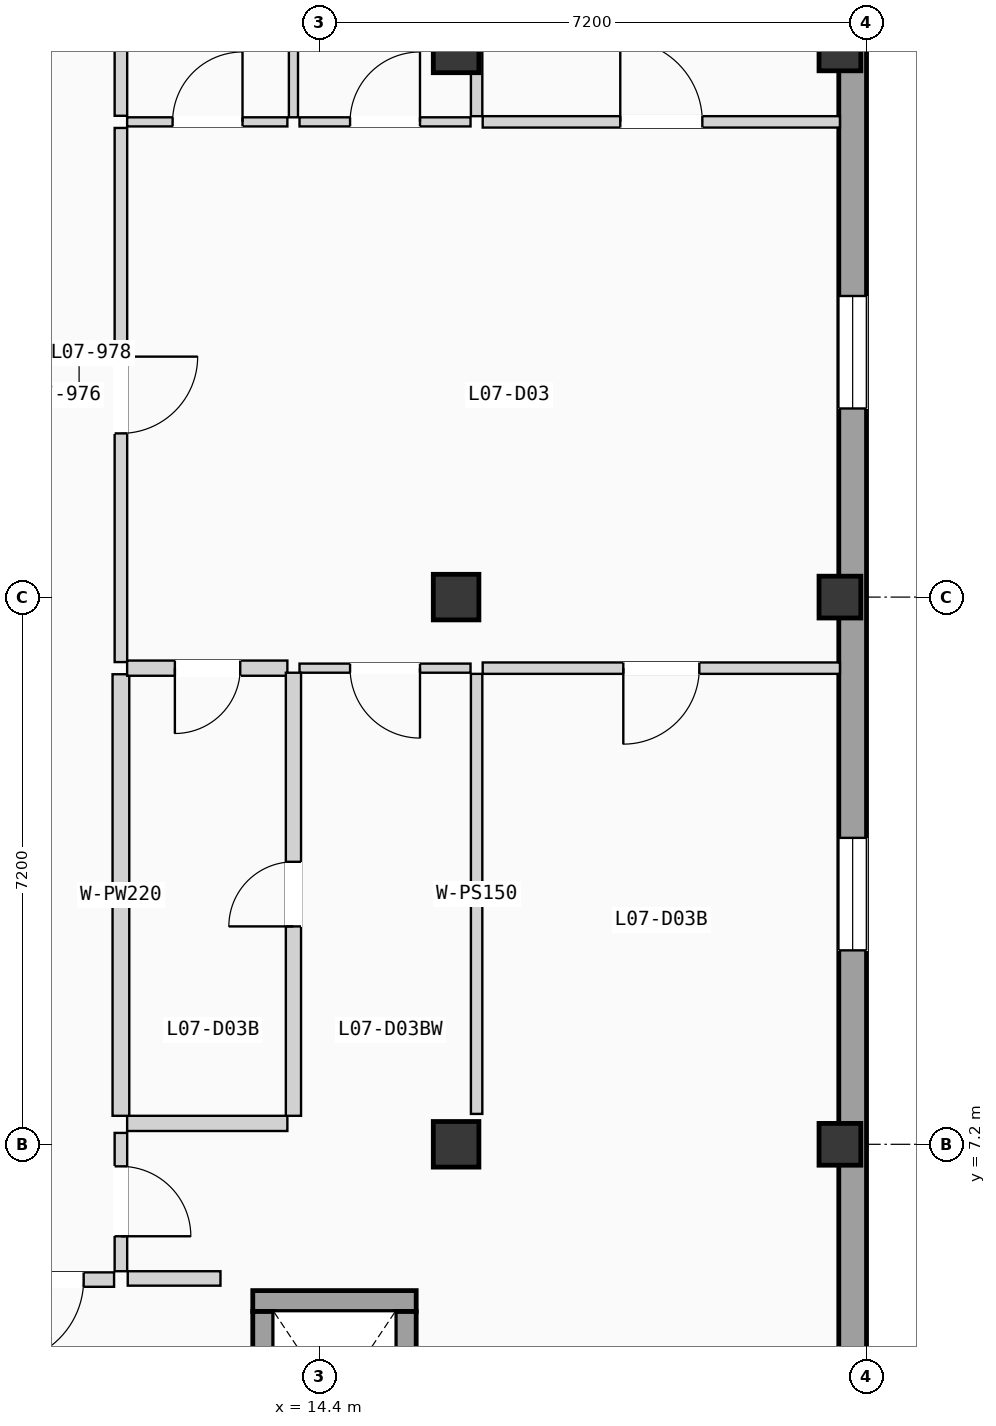
"""IFC4 building model, lengths in metres.
Left out: names, types, materials, properties, quantities, classifications, styles, units other than length and angle.
Written with IfcOpenShell. Run it as: python <this file> out.ifc"""

import sys

from ifc_helpers import new_model, si_unit, direction, frame, frame_2d, origin, origin_2d, place, context, subcontext, project, spatial, rectangle, extrude, element, fill, save


model = new_model("IFC4")
c1 = context("Model", 3, precision=1e-05, world=origin(), true_north=direction((0.0, 1.0)))
c2 = subcontext(c1, "Body", "Model", "MODEL_VIEW")
j1 = project(units=[si_unit("LENGTHUNIT", "METRE"), si_unit("PLANEANGLEUNIT", "RADIAN")], contexts=[c1])
p1 = place(None, origin())
s1 = spatial("IfcSite", under=j1, at=p1, CompositionType="ELEMENT")
p2 = place(p1, origin())
s2 = spatial("IfcBuilding", under=s1, at=p2, CompositionType="ELEMENT")
p3 = place(p2, frame((0.0, 0.0, 24.675)))
s3 = spatial("IfcBuildingStorey", under=s2, at=p3, CompositionType="ELEMENT", Elevation=24.675)
for number, where, z_axis, x_axis in (
    (1, (16.2, 7.2, 0.0), (0.0, 0.0, 1.0), (1.0, 0.0, 0.0)),
    (2, (16.2, 14.4, 0.0), (0.0, 0.0, 1.0), (1.0, 0.0, 0.0)),
    (3, (16.2, 21.6, 0.0), (0.0, 0.0, 1.0), (1.0, 0.0, 0.0)),
):
    element("IfcColumn", number, at=place(p3, frame(where, z_axis=z_axis, x_axis=x_axis)), inside=s3, PredefinedType="COLUMN", context=c2, shape_type="SweptSolid", body=[
        extrude(rectangle(XDim=0.6, YDim=0.6, at=origin_2d()), origin(), (0.0, 0.0, 1.0), 3.15),
    ])
for number, where, z_axis, x_axis in (
    (4, (21.25, 7.2, 0.0), (0.0, 0.0, 1.0), (1.0, 0.0, 0.0)),
    (5, (21.25, 14.4, 0.0), (0.0, 0.0, 1.0), (1.0, 0.0, 0.0)),
    (6, (21.25, 21.6, 0.0), (0.0, 0.0, 1.0), (1.0, 0.0, 0.0)),
):
    element("IfcColumn", number, at=place(p3, frame(where, z_axis=z_axis, x_axis=x_axis)), inside=s3, PredefinedType="COLUMN", context=c2, shape_type="SweptSolid", body=[
        extrude(rectangle(XDim=0.55, YDim=0.55, at=origin_2d()), origin(), (0.0, 0.0, 1.0), 3.15),
    ])
p4 = place(p3, frame((21.417, 0.365, 0.0), z_axis=(0.0, 0.0, 1.0), x_axis=(0.0, 1.0, 0.0)))
e7 = element("IfcWall", 7, at=p4, inside=s3, PredefinedType="SOLIDWALL", context=c2, shape_type="SweptSolid", body=[
    extrude(rectangle(XDim=49.67, YDim=0.365, at=frame_2d((24.835, 0.0))), origin(), (0.0, 0.0, 1.0), 2.6),
])
p5 = place(p4, frame((16.517, 0.0, 0.9)))
e8 = element("IfcOpeningElement", 8, at=p5, cuts=e7, PredefinedType="OPENING", context=c2, shape_type="SweptSolid", body=[
    extrude(rectangle(XDim=1.48, YDim=1.2, at=frame_2d((0.74, 0.6))), frame((0.0, 0.192, 0.0), z_axis=(0.0, -1.0, 0.0), x_axis=(1.0, 0.0, 0.0)), (0.0, 0.0, 1.0), 0.385),
])
p6 = place(p4, frame((9.387, 0.0, 0.815)))
e9 = element("IfcOpeningElement", 9, at=p6, cuts=e7, PredefinedType="OPENING", context=c2, shape_type="SweptSolid", body=[
    extrude(rectangle(XDim=1.48, YDim=1.35, at=frame_2d((0.74, 0.675))), frame((0.0, 0.192, 0.0), z_axis=(0.0, -1.0, 0.0), x_axis=(1.0, 0.0, 0.0)), (0.0, 0.0, 1.0), 0.385),
])
p7 = place(p4, frame((23.089, 0.0, 0.665)))
e10 = element("IfcOpeningElement", 10, at=p7, cuts=e7, PredefinedType="OPENING", context=c2, shape_type="SweptSolid", body=[
    extrude(rectangle(XDim=1.48, YDim=1.5, at=frame_2d((0.74, 0.75))), frame((0.0, 0.192, 0.0), z_axis=(0.0, -1.0, 0.0), x_axis=(1.0, 0.0, 0.0)), (0.0, 0.0, 1.0), 0.385),
])
p8 = place(p4, frame((32.645, 0.0, 0.515)))
e11 = element("IfcOpeningElement", 11, at=p8, cuts=e7, PredefinedType="OPENING", context=c2, shape_type="SweptSolid", body=[
    extrude(rectangle(XDim=1.48, YDim=1.65, at=frame_2d((0.74, 0.825))), frame((0.0, 0.192, 0.0), z_axis=(0.0, -1.0, 0.0), x_axis=(1.0, 0.0, 0.0)), (0.0, 0.0, 1.0), 0.385),
])
p9 = place(p4, frame((29.5, 0.0, 0.85)))
e12 = element("IfcOpeningElement", 12, at=p9, cuts=e7, PredefinedType="OPENING", context=c2, shape_type="SweptSolid", body=[
    extrude(rectangle(XDim=0.95, YDim=1.2, at=frame_2d((0.475, 0.6))), frame((0.0, 0.192, 0.0), z_axis=(0.0, -1.0, 0.0), x_axis=(1.0, 0.0, 0.0)), (0.0, 0.0, 1.0), 0.385),
])
p10 = place(p4, frame((39.179, 0.0, 0.9)))
e13 = element("IfcOpeningElement", 13, at=p10, cuts=e7, PredefinedType="OPENING", context=c2, shape_type="SweptSolid", body=[
    extrude(rectangle(XDim=1.6, YDim=1.2, at=frame_2d((0.8, 0.6))), frame((0.0, 0.192, 0.0), z_axis=(0.0, -1.0, 0.0), x_axis=(1.0, 0.0, 0.0)), (0.0, 0.0, 1.0), 0.385),
])
p11 = place(p3, frame((13.525, 5.137, 0.0), z_axis=(0.0, 0.0, 1.0), x_axis=(1.0, 0.0, 0.0)))
e14 = element("IfcWall", 14, at=p11, inside=s3, PredefinedType="SHEAR", context=c2, shape_type="SweptSolid", body=[
    extrude(rectangle(XDim=2.15, YDim=0.275, at=frame_2d((1.075, 0.0))), origin(), (0.0, 0.0, 1.0), 2.9),
])
p12 = place(p3, frame((13.663, 2.6, 0.0), z_axis=(0.0, 0.0, 1.0), x_axis=(0.0, 1.0, 0.0)))
e15 = element("IfcWall", 15, at=p12, inside=s3, PredefinedType="SHEAR", context=c2, shape_type="SweptSolid", body=[
    extrude(rectangle(XDim=2.4, YDim=0.275, at=frame_2d((1.2, 0.0))), origin(), (0.0, 0.0, 1.0), 2.9),
])
p13 = place(p12, frame((0.65, 0.0, 0.0)))
e16 = element("IfcOpeningElement", 16, at=p13, cuts=e15, PredefinedType="OPENING", context=c2, shape_type="SweptSolid", body=[
    extrude(rectangle(XDim=1.1, YDim=2.15, at=frame_2d((0.55, 1.075))), frame((0.0, 0.147, 0.0), z_axis=(0.0, -1.0, 0.0), x_axis=(1.0, 0.0, 0.0)), (0.0, 0.0, 1.0), 0.295),
])
p14 = place(p3, frame((15.538, 2.6, 0.0), z_axis=(0.0, 0.0, 1.0), x_axis=(0.0, 1.0, 0.0)))
e17 = element("IfcWall", 17, at=p14, inside=s3, PredefinedType="SHEAR", context=c2, shape_type="SweptSolid", body=[
    extrude(rectangle(XDim=2.4, YDim=0.275, at=frame_2d((1.2, 0.0))), origin(), (0.0, 0.0, 1.0), 2.9),
])
p15 = place(p3, frame((11.88, 5.435, 0.0), z_axis=(0.0, 0.0, 1.0), x_axis=(1.0, 0.0, 0.0)))
e18 = element("IfcWall", 18, at=p15, inside=s3, PredefinedType="PARTITIONING", context=c2, shape_type="SweptSolid", body=[
    extrude(rectangle(XDim=1.22, YDim=0.19, at=frame_2d((0.61, 0.0))), origin(), (0.0, 0.0, 1.0), 2.87),
])
p16 = place(p3, frame((9.7, 5.42, 0.0), z_axis=(0.0, 0.0, 1.0), x_axis=(1.0, 0.0, 0.0)))
e19 = element("IfcWall", 19, at=p16, inside=s3, PredefinedType="PARTITIONING", context=c2, shape_type="SweptSolid", body=[
    extrude(rectangle(XDim=2.0, YDim=0.19, at=frame_2d((1.0, 0.0))), origin(), (0.0, 0.0, 1.0), 2.87),
])
p17 = place(p16, frame((0.5, 0.0, 0.0)))
e20 = element("IfcOpeningElement", 20, at=p17, cuts=e19, PredefinedType="OPENING", context=c2, shape_type="SweptSolid", body=[
    extrude(rectangle(XDim=1.1, YDim=2.12, at=frame_2d((0.55, 1.06))), frame((0.0, 0.105, 0.0), z_axis=(0.0, -1.0, 0.0), x_axis=(1.0, 0.0, 0.0)), (0.0, 0.0, 1.0), 0.21),
])
p18 = place(p3, frame((11.79, 5.53, 0.0), z_axis=(0.0, 0.0, 1.0), x_axis=(0.0, 1.0, 0.0)))
e21 = element("IfcWall", 21, at=p18, inside=s3, PredefinedType="PARTITIONING", context=c2, shape_type="SweptSolid", body=[
    extrude(rectangle(XDim=1.82, YDim=0.165, at=frame_2d((0.91, 0.0))), origin(), (0.0, 0.0, 1.0), 2.87),
])
p19 = place(p18, frame((0.46, 0.0, 0.0)))
e22 = element("IfcOpeningElement", 22, at=p19, cuts=e21, PredefinedType="OPENING", context=c2, shape_type="SweptSolid", body=[
    extrude(rectangle(XDim=0.92, YDim=2.04, at=frame_2d((0.46, 1.02))), frame((0.0, 0.093, 0.0), z_axis=(0.0, -1.0, 0.0), x_axis=(1.0, 0.0, 0.0)), (0.0, 0.0, 1.0), 0.185),
])
p20 = place(p3, frame((11.872, 7.475, 0.0), z_axis=(0.0, 0.0, 1.0), x_axis=(1.0, 0.0, 0.0)))
e23 = element("IfcWall", 23, at=p20, inside=s3, PredefinedType="PLUMBINGWALL", context=c2, shape_type="SweptSolid", body=[
    extrude(rectangle(XDim=2.108, YDim=0.2, at=frame_2d((1.054, 0.0))), origin(), (0.0, 0.0, 1.0), 2.87),
])
p21 = place(p3, frame((11.79, 13.545, 0.0), z_axis=(0.0, 0.0, 1.0), x_axis=(0.0, 1.0, 0.0)))
e24 = element("IfcWall", 24, at=p21, inside=s3, PredefinedType="PARTITIONING", context=c2, shape_type="SweptSolid", body=[
    extrude(rectangle(XDim=7.028, YDim=0.165, at=frame_2d((3.514, 0.0))), origin(), (0.0, 0.0, 1.0), 2.87),
])
p22 = place(p21, frame((3.009, 0.0, 0.0)))
e25 = element("IfcOpeningElement", 25, at=p22, cuts=e24, PredefinedType="OPENING", context=c2, shape_type="SweptSolid", body=[
    extrude(rectangle(XDim=1.01, YDim=2.11, at=frame_2d((0.505, 1.055))), frame((0.0, 0.093, 0.0), z_axis=(0.0, -1.0, 0.0), x_axis=(1.0, 0.0, 0.0)), (0.0, 0.0, 1.0), 0.185),
])
p23 = place(p3, frame((11.79, 7.575, 0.0), z_axis=(0.0, 0.0, 1.0), x_axis=(0.0, 1.0, 0.0)))
e26 = element("IfcWall", 26, at=p23, inside=s3, PredefinedType="PLUMBINGWALL", context=c2, shape_type="SweptSolid", body=[
    extrude(rectangle(XDim=5.81, YDim=0.22, at=frame_2d((2.905, 0.0))), origin(), (0.0, 0.0, 1.0), 2.87),
])
p24 = place(p3, frame((11.79, 20.733, 0.0), z_axis=(0.0, 0.0, 1.0), x_axis=(0.0, 1.0, 0.0)))
e27 = element("IfcWall", 27, at=p24, inside=s3, PredefinedType="PARTITIONING", context=c2, shape_type="SweptSolid", body=[
    extrude(rectangle(XDim=5.785, YDim=0.165, at=frame_2d((2.893, 0.0))), origin(), (0.0, 0.0, 1.0), 2.87),
])
p25 = place(p3, frame((11.872, 13.465, 0.0), z_axis=(0.0, 0.0, 1.0), x_axis=(1.0, 0.0, 0.0)))
e28 = element("IfcWall", 28, at=p25, inside=s3, PredefinedType="PLUMBINGWALL", context=c2, shape_type="SweptSolid", body=[
    extrude(rectangle(XDim=2.108, YDim=0.2, at=frame_2d((1.054, 0.0))), origin(), (0.0, 0.0, 1.0), 2.87),
])
p26 = place(p25, frame((0.628, 0.0, 0.0)))
e29 = element("IfcOpeningElement", 29, at=p26, cuts=e28, PredefinedType="OPENING", context=c2, shape_type="SweptSolid", body=[
    extrude(rectangle(XDim=0.86, YDim=2.0, at=frame_2d((0.43, 1.0))), frame((0.0, 0.11, 0.0), z_axis=(0.0, -1.0, 0.0), x_axis=(1.0, 0.0, 0.0)), (0.0, 0.0, 1.0), 0.22),
])
p27 = place(p3, frame((11.872, 20.653, 0.0), z_axis=(0.0, 0.0, 1.0), x_axis=(1.0, 0.0, 0.0)))
e30 = element("IfcWall", 30, at=p27, inside=s3, PredefinedType="PARTITIONING", context=c2, shape_type="SweptSolid", body=[
    extrude(rectangle(XDim=2.108, YDim=0.12, at=frame_2d((1.054, 0.0))), origin(), (0.0, 0.0, 1.0), 2.87),
])
p28 = place(p27, frame((0.598, 0.0, 0.0)))
e31 = element("IfcOpeningElement", 31, at=p28, cuts=e30, PredefinedType="OPENING", context=c2, shape_type="SweptSolid", body=[
    extrude(rectangle(XDim=0.92, YDim=2.02, at=frame_2d((0.46, 1.01))), frame((0.0, 0.07, 0.0), z_axis=(0.0, -1.0, 0.0), x_axis=(1.0, 0.0, 0.0)), (0.0, 0.0, 1.0), 0.14),
])
p29 = place(p3, frame((16.55, 13.465, 0.0), z_axis=(0.0, 0.0, 1.0), x_axis=(1.0, 0.0, 0.0)))
e32 = element("IfcWall", 32, at=p29, inside=s3, PredefinedType="PARTITIONING", context=c2, shape_type="SweptSolid", body=[
    extrude(rectangle(XDim=4.7, YDim=0.15, at=frame_2d((2.35, 0.0))), origin(), (0.0, 0.0, 1.0), 2.87),
])
p30 = place(p29, frame((1.85, 0.0, 0.0)))
e33 = element("IfcOpeningElement", 33, at=p30, cuts=e32, PredefinedType="OPENING", context=c2, shape_type="SweptSolid", body=[
    extrude(rectangle(XDim=1.0, YDim=2.06, at=frame_2d((0.5, 1.03))), frame((0.0, 0.085, 0.0), z_axis=(0.0, -1.0, 0.0), x_axis=(1.0, 0.0, 0.0)), (0.0, 0.0, 1.0), 0.17),
])
p31 = place(p3, frame((14.14, 13.465, 0.0), z_axis=(0.0, 0.0, 1.0), x_axis=(1.0, 0.0, 0.0)))
e34 = element("IfcWall", 34, at=p31, inside=s3, PredefinedType="PARTITIONING", context=c2, shape_type="SweptSolid", body=[
    extrude(rectangle(XDim=2.25, YDim=0.12, at=frame_2d((1.125, 0.0))), origin(), (0.0, 0.0, 1.0), 2.87),
])
p32 = place(p31, frame((0.665, 0.0, 0.0)))
e35 = element("IfcOpeningElement", 35, at=p32, cuts=e34, PredefinedType="OPENING", context=c2, shape_type="SweptSolid", body=[
    extrude(rectangle(XDim=0.92, YDim=2.02, at=frame_2d((0.46, 1.01))), frame((0.0, 0.07, 0.0), z_axis=(0.0, -1.0, 0.0), x_axis=(1.0, 0.0, 0.0)), (0.0, 0.0, 1.0), 0.14),
])
p33 = place(p3, frame((16.55, 20.653, 0.0), z_axis=(0.0, 0.0, 1.0), x_axis=(1.0, 0.0, 0.0)))
e36 = element("IfcWall", 36, at=p33, inside=s3, PredefinedType="PARTITIONING", context=c2, shape_type="SweptSolid", body=[
    extrude(rectangle(XDim=4.7, YDim=0.15, at=frame_2d((2.35, 0.0))), origin(), (0.0, 0.0, 1.0), 2.87),
])
p34 = place(p33, frame((1.81, 0.0, 0.0)))
e37 = element("IfcOpeningElement", 37, at=p34, cuts=e36, PredefinedType="OPENING", context=c2, shape_type="SweptSolid", body=[
    extrude(rectangle(XDim=1.08, YDim=2.1, at=frame_2d((0.54, 1.05))), frame((0.0, 0.085, 0.0), z_axis=(0.0, -1.0, 0.0), x_axis=(1.0, 0.0, 0.0)), (0.0, 0.0, 1.0), 0.17),
])
p35 = place(p3, frame((14.14, 20.653, 0.0), z_axis=(0.0, 0.0, 1.0), x_axis=(1.0, 0.0, 0.0)))
e38 = element("IfcWall", 38, at=p35, inside=s3, PredefinedType="PARTITIONING", context=c2, shape_type="SweptSolid", body=[
    extrude(rectangle(XDim=2.25, YDim=0.12, at=frame_2d((1.125, 0.0))), origin(), (0.0, 0.0, 1.0), 2.87),
])
p36 = place(p35, frame((0.665, 0.0, 0.0)))
e39 = element("IfcOpeningElement", 39, at=p36, cuts=e38, PredefinedType="OPENING", context=c2, shape_type="SweptSolid", body=[
    extrude(rectangle(XDim=0.92, YDim=2.02, at=frame_2d((0.46, 1.01))), frame((0.0, 0.07, 0.0), z_axis=(0.0, -1.0, 0.0), x_axis=(1.0, 0.0, 0.0)), (0.0, 0.0, 1.0), 0.14),
])
p37 = place(p3, frame((14.06, 7.575, 0.0), z_axis=(0.0, 0.0, 1.0), x_axis=(0.0, 1.0, 0.0)))
e40 = element("IfcWall", 40, at=p37, inside=s3, PredefinedType="PLUMBINGWALL", context=c2, shape_type="SweptSolid", body=[
    extrude(rectangle(XDim=5.83, YDim=0.2, at=frame_2d((2.915, 0.0))), origin(), (0.0, 0.0, 1.0), 2.87),
])
p38 = place(p37, frame((2.492, 0.0, 0.0)))
e41 = element("IfcOpeningElement", 41, at=p38, cuts=e40, PredefinedType="OPENING", context=c2, shape_type="SweptSolid", body=[
    extrude(rectangle(XDim=0.85, YDim=2.01, at=frame_2d((0.425, 1.005))), frame((0.0, 0.11, 0.0), z_axis=(0.0, -1.0, 0.0), x_axis=(1.0, 0.0, 0.0)), (0.0, 0.0, 1.0), 0.22),
])
p39 = place(p3, frame((14.06, 20.713, 0.0), z_axis=(0.0, 0.0, 1.0), x_axis=(0.0, 1.0, 0.0)))
e42 = element("IfcWall", 42, at=p39, inside=s3, PredefinedType="PARTITIONING", context=c2, shape_type="SweptSolid", body=[
    extrude(rectangle(XDim=5.805, YDim=0.12, at=frame_2d((2.903, 0.0))), origin(), (0.0, 0.0, 1.0), 2.87),
])
p40 = place(p3, frame((16.47, 7.6, 0.0), z_axis=(0.0, 0.0, 1.0), x_axis=(0.0, 1.0, 0.0)))
e43 = element("IfcWall", 43, at=p40, inside=s3, PredefinedType="PARTITIONING", context=c2, shape_type="SweptSolid", body=[
    extrude(rectangle(XDim=5.79, YDim=0.15, at=frame_2d((2.895, 0.0))), origin(), (0.0, 0.0, 1.0), 2.87),
])
p41 = place(p3, frame((16.47, 20.728, 0.0), z_axis=(0.0, 0.0, 1.0), x_axis=(0.0, 1.0, 0.0)))
e44 = element("IfcWall", 44, at=p41, inside=s3, PredefinedType="PARTITIONING", context=c2, shape_type="SweptSolid", body=[
    extrude(rectangle(XDim=5.79, YDim=0.15, at=frame_2d((2.895, 0.0))), origin(), (0.0, 0.0, 1.0), 2.87),
])
p42 = place(p5, origin())
e45 = element("IfcWindow", 45, at=p42, inside=s3, PartitioningType="SINGLE_PANEL", PredefinedType="WINDOW", context=c2, shape_type="SweptSolid", body=[
    extrude(rectangle(XDim=1.48, YDim=1.2, at=frame_2d((0.74, 0.6))), frame((0.0, 0.03, 0.0), z_axis=(0.0, -1.0, 0.0), x_axis=(1.0, 0.0, 0.0)), (0.0, 0.0, 1.0), 0.06),
])
fill(e8, e45)
p43 = place(p6, origin())
e46 = element("IfcWindow", 46, at=p43, inside=s3, PartitioningType="SINGLE_PANEL", PredefinedType="WINDOW", context=c2, shape_type="SweptSolid", body=[
    extrude(rectangle(XDim=1.48, YDim=1.35, at=frame_2d((0.74, 0.675))), frame((0.0, 0.03, 0.0), z_axis=(0.0, -1.0, 0.0), x_axis=(1.0, 0.0, 0.0)), (0.0, 0.0, 1.0), 0.06),
])
fill(e9, e46)
p44 = place(p17, frame((1.1, 0.0, 0.0), z_axis=(0.0, 0.0, 1.0), x_axis=(-1.0, 0.0, 0.0)))
e47 = element("IfcDoor", 47, at=p44, inside=s3, OperationType="SINGLE_SWING_LEFT", PredefinedType="DOOR", context=c2, shape_type="SweptSolid", body=[
    extrude(rectangle(XDim=1.1, YDim=2.12, at=frame_2d((0.55, 1.06))), frame((0.0, 0.025, 0.0), z_axis=(0.0, -1.0, 0.0), x_axis=(1.0, 0.0, 0.0)), (0.0, 0.0, 1.0), 0.05),
])
fill(e20, e47)
p45 = place(p19, frame((0.92, 0.0, 0.0), z_axis=(0.0, 0.0, 1.0), x_axis=(-1.0, 0.0, 0.0)))
e48 = element("IfcDoor", 48, at=p45, inside=s3, OperationType="SINGLE_SWING_LEFT", PredefinedType="DOOR", context=c2, shape_type="SweptSolid", body=[
    extrude(rectangle(XDim=0.92, YDim=2.04, at=frame_2d((0.46, 1.02))), frame((0.0, 0.025, 0.0), z_axis=(0.0, -1.0, 0.0), x_axis=(1.0, 0.0, 0.0)), (0.0, 0.0, 1.0), 0.05),
])
fill(e22, e48)
p46 = place(p22, frame((1.01, 0.0, 0.0), z_axis=(0.0, 0.0, 1.0), x_axis=(-1.0, 0.0, 0.0)))
e49 = element("IfcDoor", 49, at=p46, inside=s3, OperationType="SINGLE_SWING_RIGHT", PredefinedType="DOOR", context=c2, shape_type="SweptSolid", body=[
    extrude(rectangle(XDim=1.01, YDim=2.11, at=frame_2d((0.505, 1.055))), frame((0.0, 0.025, 0.0), z_axis=(0.0, -1.0, 0.0), x_axis=(1.0, 0.0, 0.0)), (0.0, 0.0, 1.0), 0.05),
])
fill(e25, e49)
p47 = place(p26, frame((0.86, 0.0, 0.0), z_axis=(0.0, 0.0, 1.0), x_axis=(-1.0, 0.0, 0.0)))
e50 = element("IfcDoor", 50, at=p47, inside=s3, OperationType="SINGLE_SWING_LEFT", PredefinedType="DOOR", context=c2, shape_type="SweptSolid", body=[
    extrude(rectangle(XDim=0.86, YDim=2.0, at=frame_2d((0.43, 1.0))), frame((0.0, 0.025, 0.0), z_axis=(0.0, -1.0, 0.0), x_axis=(1.0, 0.0, 0.0)), (0.0, 0.0, 1.0), 0.05),
])
fill(e29, e50)
p48 = place(p28, origin())
e51 = element("IfcDoor", 51, at=p48, inside=s3, OperationType="SINGLE_SWING_RIGHT", PredefinedType="DOOR", context=c2, shape_type="SweptSolid", body=[
    extrude(rectangle(XDim=0.92, YDim=2.02, at=frame_2d((0.46, 1.01))), frame((0.0, 0.025, 0.0), z_axis=(0.0, -1.0, 0.0), x_axis=(1.0, 0.0, 0.0)), (0.0, 0.0, 1.0), 0.05),
])
fill(e31, e51)
p49 = place(p30, frame((1.0, 0.0, 0.0), z_axis=(0.0, 0.0, 1.0), x_axis=(-1.0, 0.0, 0.0)))
e52 = element("IfcDoor", 52, at=p49, inside=s3, OperationType="SINGLE_SWING_LEFT", PredefinedType="DOOR", context=c2, shape_type="SweptSolid", body=[
    extrude(rectangle(XDim=1.0, YDim=2.06, at=frame_2d((0.5, 1.03))), frame((0.0, 0.025, 0.0), z_axis=(0.0, -1.0, 0.0), x_axis=(1.0, 0.0, 0.0)), (0.0, 0.0, 1.0), 0.05),
])
fill(e33, e52)
p50 = place(p32, frame((0.92, 0.0, 0.0), z_axis=(0.0, 0.0, 1.0), x_axis=(-1.0, 0.0, 0.0)))
e53 = element("IfcDoor", 53, at=p50, inside=s3, OperationType="SINGLE_SWING_RIGHT", PredefinedType="DOOR", context=c2, shape_type="SweptSolid", body=[
    extrude(rectangle(XDim=0.92, YDim=2.02, at=frame_2d((0.46, 1.01))), frame((0.0, 0.025, 0.0), z_axis=(0.0, -1.0, 0.0), x_axis=(1.0, 0.0, 0.0)), (0.0, 0.0, 1.0), 0.05),
])
fill(e35, e53)
p51 = place(p34, origin())
e54 = element("IfcDoor", 54, at=p51, inside=s3, OperationType="SINGLE_SWING_LEFT", PredefinedType="DOOR", context=c2, shape_type="SweptSolid", body=[
    extrude(rectangle(XDim=1.08, YDim=2.1, at=frame_2d((0.54, 1.05))), frame((0.0, 0.025, 0.0), z_axis=(0.0, -1.0, 0.0), x_axis=(1.0, 0.0, 0.0)), (0.0, 0.0, 1.0), 0.05),
])
fill(e37, e54)
p52 = place(p36, origin())
e55 = element("IfcDoor", 55, at=p52, inside=s3, OperationType="SINGLE_SWING_RIGHT", PredefinedType="DOOR", context=c2, shape_type="SweptSolid", body=[
    extrude(rectangle(XDim=0.92, YDim=2.02, at=frame_2d((0.46, 1.01))), frame((0.0, 0.025, 0.0), z_axis=(0.0, -1.0, 0.0), x_axis=(1.0, 0.0, 0.0)), (0.0, 0.0, 1.0), 0.05),
])
fill(e39, e55)
p53 = place(p38, origin())
e56 = element("IfcDoor", 56, at=p53, inside=s3, OperationType="SINGLE_SWING_LEFT", PredefinedType="DOOR", context=c2, shape_type="SweptSolid", body=[
    extrude(rectangle(XDim=0.85, YDim=2.01, at=frame_2d((0.425, 1.005))), frame((0.0, 0.025, 0.0), z_axis=(0.0, -1.0, 0.0), x_axis=(1.0, 0.0, 0.0)), (0.0, 0.0, 1.0), 0.05),
])
fill(e41, e56)
save(model, sys.argv[1])
